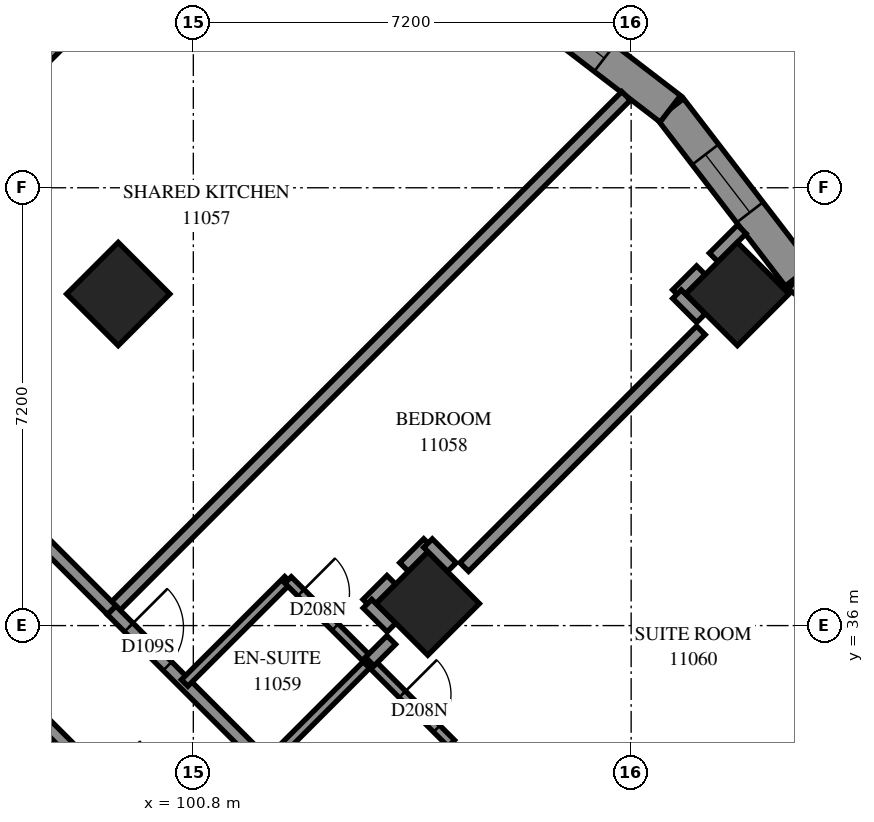
"""IFC4 building model, lengths in metres.
Left out: names, types, materials, properties, quantities, classifications, styles, units other than length and angle.
Written with IfcOpenShell. Run it as: python <this file> out.ifc"""

import sys

from ifc_helpers import new_model, si_unit, direction, frame, frame_2d, origin, origin_2d, place, context, subcontext, project, spatial, polyline, rectangle, outline, extrude, element, fill, save


model = new_model("IFC4")
c1 = context("Model", 3, precision=1e-05, world=origin(), true_north=direction((0.0, 1.0)))
c2 = subcontext(c1, "Body", "Model", "MODEL_VIEW")
j1 = project(units=[si_unit("LENGTHUNIT", "METRE"), si_unit("PLANEANGLEUNIT", "RADIAN")], contexts=[c1])
p1 = place(None, origin())
s1 = spatial("IfcSite", under=j1, at=p1, CompositionType="ELEMENT")
p2 = place(p1, origin())
s2 = spatial("IfcBuilding", under=s1, at=p2, CompositionType="ELEMENT")
p3 = place(p2, frame((0.0, 0.0, 44.0)))
s3 = spatial("IfcBuildingStorey", under=s2, at=p3, CompositionType="ELEMENT", Elevation=44.0)
for number, where, z_axis, x_axis in (
    (1, (99.565, 41.453, 0.0), (0.0, 0.0, 1.0), (0.707, -0.707, 0.0)),
    (2, (109.747, 41.453, 0.0), (0.0, 0.0, 1.0), (0.707, -0.707, 0.0)),
    (3, (104.656, 36.362, 0.0), (0.0, 0.0, 1.0), (0.707, -0.707, 0.0)),
):
    element("IfcColumn", number, at=place(p3, frame(where, z_axis=z_axis, x_axis=x_axis)), inside=s3, PredefinedType="COLUMN", context=c2, shape_type="SweptSolid", body=[
        extrude(rectangle(XDim=1.2, YDim=1.2, at=origin_2d()), origin(), (0.0, 0.0, 1.0), 3.1),
    ])
p4 = place(p3, frame((113.5, 39.643, 0.0), z_axis=(0.0, 0.0, 1.0), x_axis=(-0.7931776144, 0.6089903711, 0.0)))
e4 = element("IfcWall", 4, at=p4, inside=s3, PredefinedType="SOLIDWALL", context=c2, shape_type="SweptSolid", body=[
    extrude(outline(polyline([(-0.036, -0.275), (3.427, -0.275), (3.499, 0.275), (0.036, 0.275), (-0.036, -0.275)])), origin(), (0.0, 0.0, 1.0), 3.1),
])
p5 = place(p4, frame((1.2, 0.0, 0.5)))
e5 = element("IfcOpeningElement", 5, at=p5, cuts=e4, PredefinedType="OPENING", context=c2, shape_type="SweptSolid", body=[
    extrude(rectangle(XDim=1.2, YDim=2.45, at=frame_2d((0.6, 1.225))), frame((0.0, 0.285, 0.0), z_axis=(0.0, -1.0, 0.0), x_axis=(1.0, 0.0, 0.0)), (0.0, 0.0, 1.0), 0.57),
])
p6 = place(p3, frame((110.753, 41.752, 0.0), z_axis=(0.0, 0.0, 1.0), x_axis=(-0.6090043207, 0.7931669038, 0.0)))
e6 = element("IfcWall", 6, at=p6, inside=s3, PredefinedType="SOLIDWALL", context=c2, shape_type="SweptSolid", body=[
    extrude(outline(polyline([(0.036, -0.275), (3.499, -0.275), (3.427, 0.275), (-0.036, 0.275), (0.036, -0.275)])), origin(), (0.0, 0.0, 1.0), 3.1),
])
p7 = place(p6, frame((1.315, 0.0, 0.5)))
e7 = element("IfcOpeningElement", 7, at=p7, cuts=e6, PredefinedType="OPENING", context=c2, shape_type="SweptSolid", body=[
    extrude(rectangle(XDim=1.2, YDim=2.45, at=frame_2d((0.6, 1.225))), frame((0.0, 0.285, 0.0), z_axis=(0.0, -1.0, 0.0), x_axis=(1.0, 0.0, 0.0)), (0.0, 0.0, 1.0), 0.57),
])
p8 = place(p3, frame((108.644, 44.498, 0.0), z_axis=(0.0, 0.0, 1.0), x_axis=(-0.7931776144, 0.6089903711, 0.0)))
e8 = element("IfcWall", 8, at=p8, inside=s3, PredefinedType="SOLIDWALL", context=c2, shape_type="SweptSolid", body=[
    extrude(outline(polyline([(-0.036, -0.275), (3.427, -0.275), (3.499, 0.275), (0.036, 0.275), (-0.036, -0.275)])), origin(), (0.0, 0.0, 1.0), 3.1),
])
p9 = place(p8, frame((1.368, 0.0, 0.5)))
e9 = element("IfcOpeningElement", 9, at=p9, cuts=e8, PredefinedType="OPENING", context=c2, shape_type="SweptSolid", body=[
    extrude(rectangle(XDim=1.2, YDim=2.45, at=frame_2d((0.6, 1.225))), frame((0.0, 0.285, 0.0), z_axis=(0.0, -1.0, 0.0), x_axis=(1.0, 0.0, 0.0)), (0.0, 0.0, 1.0), 0.57),
])
p10 = place(p3, frame((99.459, 36.255, 0.0), z_axis=(0.0, 0.0, 1.0), x_axis=(0.7071903932, 0.7070231593, 0.0)))
e10 = element("IfcWall", 10, at=p10, inside=s3, PredefinedType="PARTITIONING", context=c2, shape_type="SweptSolid", body=[
    extrude(rectangle(XDim=11.959, YDim=0.2, at=frame_2d((5.98, 0.0))), origin(), (0.0, 0.0, 1.0), 3.1),
])
p11 = place(p3, frame((94.367, 41.349, 0.0), z_axis=(0.0, 0.0, 1.0), x_axis=(0.7071109781, 0.7071025843, 0.0)))
e11 = element("IfcWall", 11, at=p11, inside=s3, PredefinedType="PARTITIONING", context=c2, shape_type="SweptSolid", body=[
    extrude(rectangle(XDim=11.914, YDim=0.2, at=frame_2d((5.957, 0.0))), origin(), (0.0, 0.0, 1.0), 3.1),
])
p12 = place(p3, frame((93.59, 42.126, 0.0), z_axis=(0.0, 0.0, 1.0), x_axis=(0.7071067812, 0.7071067812, 0.0)))
e12 = element("IfcWall", 12, at=p12, inside=s3, PredefinedType="PARTITIONING", context=c2, shape_type="SweptSolid", body=[
    extrude(rectangle(XDim=9.849, YDim=0.2, at=frame_2d((4.924, 0.0))), origin(), (0.0, 0.0, 1.0), 3.1),
])
p13 = place(p12, frame((0.148, 0.0, 0.0)))
e13 = element("IfcOpeningElement", 13, at=p13, cuts=e12, PredefinedType="OPENING", context=c2, shape_type="SweptSolid", body=[
    extrude(rectangle(XDim=1.0, YDim=2.1, at=frame_2d((0.5, 1.05))), frame((0.0, 0.11, 0.0), z_axis=(0.0, -1.0, 0.0), x_axis=(1.0, 0.0, 0.0)), (0.0, 0.0, 1.0), 0.22),
])
p14 = place(p3, frame((99.455, 36.253, 0.0), z_axis=(0.0, 0.0, 1.0), x_axis=(0.7071067812, -0.7071067812, 0.0)))
e14 = element("IfcWall", 14, at=p14, inside=s3, PredefinedType="PARTITIONING", context=c2, shape_type="SweptSolid", body=[
    extrude(rectangle(XDim=7.201, YDim=0.2, at=frame_2d((3.601, 0.0))), origin(), (0.0, 0.0, 1.0), 3.1),
])
p15 = place(p14, frame((0.401, 0.0, 0.0)))
e15 = element("IfcOpeningElement", 15, at=p15, cuts=e14, PredefinedType="OPENING", context=c2, shape_type="SweptSolid", body=[
    extrude(rectangle(XDim=0.9, YDim=2.1, at=frame_2d((0.45, 1.05))), frame((0.0, 0.11, 0.0), z_axis=(0.0, -1.0, 0.0), x_axis=(1.0, 0.0, 0.0)), (0.0, 0.0, 1.0), 0.22),
])
for number, where, z_axis, x_axis in (
    (16, (110.345, 31.871, 0.0), (0.0, 0.0, 1.0), (0.707, 0.707, 0.0)),
    (17, (105.255, 36.963, 0.0), (0.0, 0.0, 1.0), (0.707, 0.707, 0.0)),
):
    element("IfcWall", number, at=place(p3, frame(where, z_axis=z_axis, x_axis=x_axis)), inside=s3, PredefinedType="PARTITIONING", context=c2, shape_type="SweptSolid", body=[
        extrude(rectangle(XDim=5.504, YDim=0.2, at=frame_2d((2.752, 0.0))), origin(), (0.0, 0.0, 1.0), 3.1),
    ])
p16 = place(p3, frame((96.913, 38.801, 0.0), z_axis=(0.0, 0.0, 1.0), x_axis=(0.7068288851, -0.7073845681, 0.0)))
e18 = element("IfcWall", 18, at=p16, inside=s3, PredefinedType="PARTITIONING", context=c2, shape_type="SweptSolid", body=[
    extrude(rectangle(XDim=3.599, YDim=0.2, at=frame_2d((1.8, 0.0))), origin(), (0.0, 0.0, 1.0), 3.1),
])
p17 = place(p3, frame((97.976, 34.772, 0.0), z_axis=(0.0, 0.0, 1.0), x_axis=(0.7073845681, -0.7068288851, 0.0)))
e19 = element("IfcWall", 19, at=p17, inside=s3, PredefinedType="PARTITIONING", context=c2, shape_type="SweptSolid", body=[
    extrude(rectangle(XDim=3.599, YDim=0.2, at=frame_2d((1.8, 0.0))), origin(), (0.0, 0.0, 1.0), 3.1),
])
p18 = place(p17, frame((1.858, 0.0, 0.0)))
e20 = element("IfcOpeningElement", 20, at=p18, cuts=e19, PredefinedType="OPENING", context=c2, shape_type="SweptSolid", body=[
    extrude(rectangle(XDim=0.9, YDim=2.1, at=frame_2d((0.45, 1.05))), frame((0.0, 0.11, 0.0), z_axis=(0.0, -1.0, 0.0), x_axis=(1.0, 0.0, 0.0)), (0.0, 0.0, 1.0), 0.22),
])
p19 = place(p3, frame((102.003, 33.711, 0.0), z_axis=(0.0, 0.0, 1.0), x_axis=(0.7071067812, 0.7071067812, 0.0)))
e21 = element("IfcWall", 21, at=p19, inside=s3, PredefinedType="PARTITIONING", context=c2, shape_type="SweptSolid", body=[
    extrude(rectangle(XDim=2.401, YDim=0.15, at=frame_2d((1.201, 0.0))), origin(), (0.0, 0.0, 1.0), 3.1),
])
for number, where, z_axis, x_axis in (
    (22, (100.657, 35.057, 0.0), (0.0, 0.0, 1.0), (0.708, 0.707, 0.0)),
    (23, (103.349, 32.365, 0.0), (0.0, 0.0, 1.0), (0.707, 0.708, 0.0)),
):
    element("IfcWall", number, at=place(p3, frame(where, z_axis=z_axis, x_axis=x_axis)), inside=s3, PredefinedType="PARTITIONING", context=c2, shape_type="SweptSolid", body=[
        extrude(rectangle(XDim=2.4, YDim=0.15, at=frame_2d((1.2, 0.0))), origin(), (0.0, 0.0, 1.0), 3.1),
    ])
p20 = place(p3, frame((103.701, 35.407, 0.0), z_axis=(0.0, 0.0, 1.0), x_axis=(0.7065800724, -0.7076330979, 0.0)))
e24 = element("IfcWall", 24, at=p20, inside=s3, PredefinedType="PARTITIONING", context=c2, shape_type="SweptSolid", body=[
    extrude(rectangle(XDim=1.899, YDim=0.15, at=frame_2d((0.95, 0.0))), origin(), (0.0, 0.0, 1.0), 3.1),
])
p21 = place(p20, frame((0.759, 0.0, 0.0)))
e25 = element("IfcOpeningElement", 25, at=p21, cuts=e24, PredefinedType="OPENING", context=c2, shape_type="SweptSolid", body=[
    extrude(rectangle(XDim=0.8, YDim=2.1, at=frame_2d((0.4, 1.05))), frame((0.0, 0.085, 0.0), z_axis=(0.0, -1.0, 0.0), x_axis=(1.0, 0.0, 0.0)), (0.0, 0.0, 1.0), 0.17),
])
p22 = place(p3, frame((102.358, 36.75, 0.0), z_axis=(0.0, 0.0, 1.0), x_axis=(0.7076330979, -0.7065800724, 0.0)))
e26 = element("IfcWall", 26, at=p22, inside=s3, PredefinedType="PARTITIONING", context=c2, shape_type="SweptSolid", body=[
    extrude(rectangle(XDim=1.899, YDim=0.15, at=frame_2d((0.95, 0.0))), origin(), (0.0, 0.0, 1.0), 3.1),
])
p23 = place(p22, frame((0.296, 0.0, 0.0)))
e27 = element("IfcOpeningElement", 27, at=p23, cuts=e26, PredefinedType="OPENING", context=c2, shape_type="SweptSolid", body=[
    extrude(rectangle(XDim=0.8, YDim=2.1, at=frame_2d((0.4, 1.05))), frame((0.0, 0.085, 0.0), z_axis=(0.0, -1.0, 0.0), x_axis=(1.0, 0.0, 0.0)), (0.0, 0.0, 1.0), 0.17),
])
p24 = place(p3, frame((109.357, 42.055, 0.0), z_axis=(0.0, 0.0, 1.0), x_axis=(0.7071067812, 0.7071067812, 0.0)))
e28 = element("IfcWall", 28, at=p24, inside=s3, PredefinedType="PARTITIONING", context=c2, shape_type="SweptSolid", body=[
    extrude(rectangle(XDim=0.653, YDim=0.2, at=frame_2d((0.327, 0.0))), origin(), (0.0, 0.0, 1.0), 3.1),
])
for number, where, z_axis, x_axis in (
    (29, (108.753, 41.451, 0.0), (0.0, 0.0, 1.0), (0.707, 0.707, 0.0)),
    (30, (108.754, 41.45, 0.0), (0.0, 0.0, 1.0), (0.707, -0.707, 0.0)),
    (31, (103.661, 36.359, 0.0), (0.0, 0.0, 1.0), (0.707, 0.707, 0.0)),
    (32, (104.265, 36.963, 0.0), (0.0, 0.0, 1.0), (0.707, 0.707, 0.0)),
):
    element("IfcWall", number, at=place(p3, frame(where, z_axis=z_axis, x_axis=x_axis)), inside=s3, PredefinedType="PARTITIONING", context=c2, shape_type="SweptSolid", body=[
        extrude(rectangle(XDim=0.557, YDim=0.2, at=frame_2d((0.279, 0.0))), origin(), (0.0, 0.0, 1.0), 3.1),
    ])
for number, where, z_axis, x_axis in (
    (33, (104.659, 37.355, 0.0), (0.0, 0.0, 1.0), (0.705, -0.709, 0.0)),
    (34, (103.664, 36.36, 0.0), (0.0, 0.0, 1.0), (0.709, -0.705, 0.0)),
):
    element("IfcWall", number, at=place(p3, frame(where, z_axis=z_axis, x_axis=x_axis)), inside=s3, PredefinedType="PARTITIONING", context=c2, shape_type="SweptSolid", body=[
        extrude(rectangle(XDim=0.556, YDim=0.2, at=frame_2d((0.278, 0.0))), origin(), (0.0, 0.0, 1.0), 3.1),
    ])
p25 = place(p3, frame((103.701, 35.409, 0.0), z_axis=(0.0, 0.0, 1.0), x_axis=(0.7071067812, 0.7071067812, 0.0)))
e35 = element("IfcWall", 35, at=p25, inside=s3, PredefinedType="PARTITIONING", context=c2, shape_type="SweptSolid", body=[
    extrude(rectangle(XDim=0.501, YDim=0.2, at=frame_2d((0.25, 0.0))), origin(), (0.0, 0.0, 1.0), 3.1),
])
p26 = place(p7, origin())
e36 = element("IfcWindow", 36, at=p26, inside=s3, PartitioningType="SINGLE_PANEL", PredefinedType="WINDOW", context=c2, shape_type="SweptSolid", body=[
    extrude(rectangle(XDim=1.2, YDim=2.45, at=frame_2d((0.6, 1.225))), frame((0.0, 0.155, 0.0), z_axis=(0.0, -1.0, 0.0), x_axis=(1.0, 0.0, 0.0)), (0.0, 0.0, 1.0), 0.06),
])
fill(e7, e36)
p27 = place(p9, origin())
e37 = element("IfcWindow", 37, at=p27, inside=s3, PartitioningType="SINGLE_PANEL", PredefinedType="WINDOW", context=c2, shape_type="SweptSolid", body=[
    extrude(rectangle(XDim=1.2, YDim=2.45, at=frame_2d((0.6, 1.225))), frame((0.0, 0.155, 0.0), z_axis=(0.0, -1.0, 0.0), x_axis=(1.0, 0.0, 0.0)), (0.0, 0.0, 1.0), 0.06),
])
fill(e9, e37)
p28 = place(p15, origin())
e38 = element("IfcDoor", 38, at=p28, inside=s3, OperationType="SINGLE_SWING_RIGHT", PredefinedType="DOOR", context=c2, shape_type="SweptSolid", body=[
    extrude(rectangle(XDim=0.9, YDim=2.1, at=frame_2d((0.45, 1.05))), frame((0.0, 0.025, 0.0), z_axis=(0.0, -1.0, 0.0), x_axis=(1.0, 0.0, 0.0)), (0.0, 0.0, 1.0), 0.05),
])
fill(e15, e38)
p29 = place(p23, origin())
e39 = element("IfcDoor", 39, at=p29, inside=s3, OperationType="SINGLE_SWING_RIGHT", PredefinedType="DOOR", context=c2, shape_type="SweptSolid", body=[
    extrude(rectangle(XDim=0.8, YDim=2.1, at=frame_2d((0.4, 1.05))), frame((0.0, 0.025, 0.0), z_axis=(0.0, -1.0, 0.0), x_axis=(1.0, 0.0, 0.0)), (0.0, 0.0, 1.0), 0.05),
])
fill(e27, e39)
p30 = place(p21, origin())
e40 = element("IfcDoor", 40, at=p30, inside=s3, OperationType="SINGLE_SWING_RIGHT", PredefinedType="DOOR", context=c2, shape_type="SweptSolid", body=[
    extrude(rectangle(XDim=0.8, YDim=2.1, at=frame_2d((0.4, 1.05))), frame((0.0, 0.025, 0.0), z_axis=(0.0, -1.0, 0.0), x_axis=(1.0, 0.0, 0.0)), (0.0, 0.0, 1.0), 0.05),
])
fill(e25, e40)
save(model, sys.argv[1])
